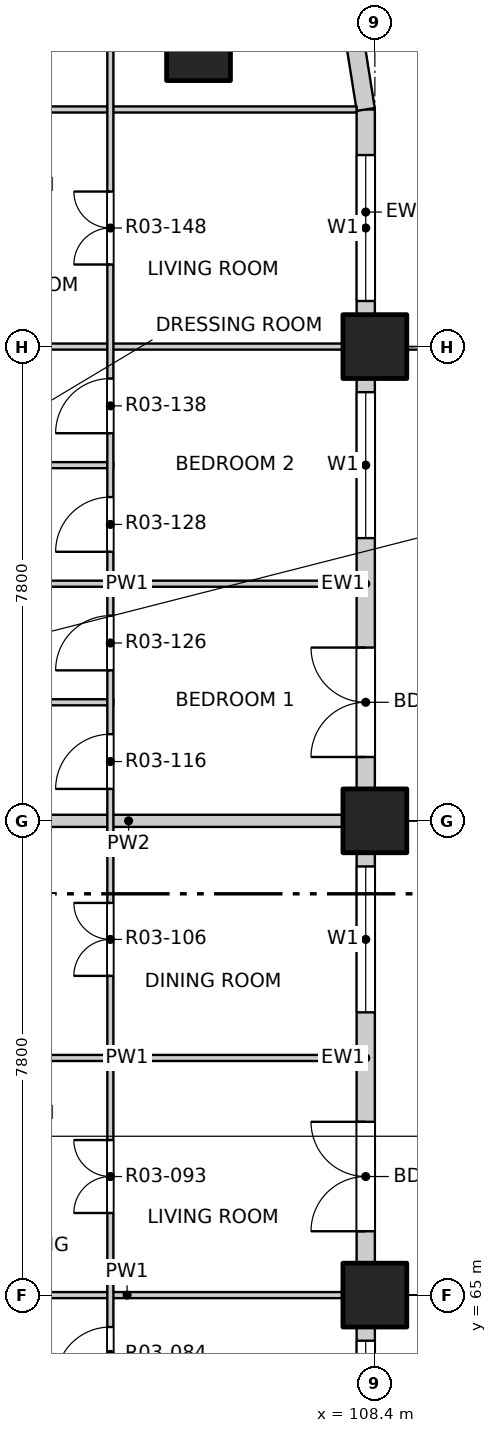
"""IFC4 building model, lengths in metres.
Left out: names, types, materials, properties, quantities, classifications, styles, units other than length and angle.
Written with IfcOpenShell. Run it as: python <this file> out.ifc"""

import sys

from ifc_helpers import new_model, si_unit, direction, frame, frame_2d, origin, origin_2d, place, context, subcontext, project, spatial, rectangle, extrude, element, fill, save


model = new_model("IFC4")
c1 = context("Model", 3, precision=1e-05, world=origin(), true_north=direction((0.0, 1.0)))
c2 = subcontext(c1, "Body", "Model", "MODEL_VIEW")
j1 = project(units=[si_unit("LENGTHUNIT", "METRE"), si_unit("PLANEANGLEUNIT", "RADIAN")], contexts=[c1])
p1 = place(None, origin())
s1 = spatial("IfcSite", under=j1, at=p1, CompositionType="ELEMENT")
p2 = place(p1, origin())
s2 = spatial("IfcBuilding", under=s1, at=p2, CompositionType="ELEMENT")
p3 = place(p2, frame((0.0, 0.0, 39.9)))
s3 = spatial("IfcBuildingStorey", under=s2, at=p3, CompositionType="ELEMENT", Elevation=39.9)
for number, where, z_axis, x_axis in (
    (1, (105.5, 85.5, -0.25), (0.0, 0.0, 1.0), (1.0, 0.0, 0.0)),
    (2, (108.4, 65.0, -0.25), (0.0, 0.0, 1.0), (1.0, 0.0, 0.0)),
    (3, (108.4, 72.8, -0.25), (0.0, 0.0, 1.0), (1.0, 0.0, 0.0)),
    (4, (108.4, 80.6, -0.25), (0.0, 0.0, 1.0), (1.0, 0.0, 0.0)),
):
    element("IfcColumn", number, at=place(p3, frame(where, z_axis=z_axis, x_axis=x_axis)), inside=s3, PredefinedType="COLUMN", context=c2, shape_type="SweptSolid", body=[
        extrude(rectangle(XDim=1.05, YDim=1.05, at=origin_2d()), origin(), (0.0, 0.0, 1.0), 3.4),
    ])
p4 = place(p3, frame((108.25, 57.725, 0.0), z_axis=(0.0, 0.0, 1.0), x_axis=(0.0, 1.0, 0.0)))
e5 = element("IfcWall", 5, at=p4, inside=s3, PredefinedType="SOLIDWALL", context=c2, shape_type="SweptSolid", body=[
    extrude(rectangle(XDim=6.75, YDim=0.3, at=frame_2d((3.375, 0.0))), origin(), (0.0, 0.0, 1.0), 2.7),
])
p5 = place(p4, frame((0.525, 0.0, 0.0)))
e6 = element("IfcOpeningElement", 6, at=p5, cuts=e5, PredefinedType="OPENING", context=c2, shape_type="SweptSolid", body=[
    extrude(rectangle(XDim=1.8, YDim=2.4, at=frame_2d((0.9, 1.2))), frame((0.0, 0.16, 0.0), z_axis=(0.0, -1.0, 0.0), x_axis=(1.0, 0.0, 0.0)), (0.0, 0.0, 1.0), 0.32),
])
p6 = place(p4, frame((4.125, 0.0, 0.9)))
e7 = element("IfcOpeningElement", 7, at=p6, cuts=e5, PredefinedType="OPENING", context=c2, shape_type="SweptSolid", body=[
    extrude(rectangle(XDim=2.4, YDim=1.8, at=frame_2d((1.2, 0.9))), frame((0.0, 0.16, 0.0), z_axis=(0.0, -1.0, 0.0), x_axis=(1.0, 0.0, 0.0)), (0.0, 0.0, 1.0), 0.32),
])
p7 = place(p3, frame((108.25, 65.525, 0.0), z_axis=(0.0, 0.0, 1.0), x_axis=(0.0, 1.0, 0.0)))
e8 = element("IfcWall", 8, at=p7, inside=s3, PredefinedType="SOLIDWALL", context=c2, shape_type="SweptSolid", body=[
    extrude(rectangle(XDim=6.75, YDim=0.3, at=frame_2d((3.375, 0.0))), origin(), (0.0, 0.0, 1.0), 2.7),
])
p8 = place(p7, frame((0.525, 0.0, 0.0)))
e9 = element("IfcOpeningElement", 9, at=p8, cuts=e8, PredefinedType="OPENING", context=c2, shape_type="SweptSolid", body=[
    extrude(rectangle(XDim=1.8, YDim=2.4, at=frame_2d((0.9, 1.2))), frame((0.0, 0.16, 0.0), z_axis=(0.0, -1.0, 0.0), x_axis=(1.0, 0.0, 0.0)), (0.0, 0.0, 1.0), 0.32),
])
p9 = place(p7, frame((4.125, 0.0, 0.9)))
e10 = element("IfcOpeningElement", 10, at=p9, cuts=e8, PredefinedType="OPENING", context=c2, shape_type="SweptSolid", body=[
    extrude(rectangle(XDim=2.4, YDim=1.8, at=frame_2d((1.2, 0.9))), frame((0.0, 0.16, 0.0), z_axis=(0.0, -1.0, 0.0), x_axis=(1.0, 0.0, 0.0)), (0.0, 0.0, 1.0), 0.32),
])
p10 = place(p3, frame((108.25, 73.325, 0.0), z_axis=(0.0, 0.0, 1.0), x_axis=(0.0, 1.0, 0.0)))
e11 = element("IfcWall", 11, at=p10, inside=s3, PredefinedType="SOLIDWALL", context=c2, shape_type="SweptSolid", body=[
    extrude(rectangle(XDim=6.75, YDim=0.3, at=frame_2d((3.375, 0.0))), origin(), (0.0, 0.0, 1.0), 2.7),
])
p11 = place(p10, frame((0.525, 0.0, 0.0)))
e12 = element("IfcOpeningElement", 12, at=p11, cuts=e11, PredefinedType="OPENING", context=c2, shape_type="SweptSolid", body=[
    extrude(rectangle(XDim=1.8, YDim=2.4, at=frame_2d((0.9, 1.2))), frame((0.0, 0.16, 0.0), z_axis=(0.0, -1.0, 0.0), x_axis=(1.0, 0.0, 0.0)), (0.0, 0.0, 1.0), 0.32),
])
p12 = place(p10, frame((4.125, 0.0, 0.9)))
e13 = element("IfcOpeningElement", 13, at=p12, cuts=e11, PredefinedType="OPENING", context=c2, shape_type="SweptSolid", body=[
    extrude(rectangle(XDim=2.4, YDim=1.8, at=frame_2d((1.2, 0.9))), frame((0.0, 0.16, 0.0), z_axis=(0.0, -1.0, 0.0), x_axis=(1.0, 0.0, 0.0)), (0.0, 0.0, 1.0), 0.32),
])
p13 = place(p3, frame((108.25, 81.125, 0.0), z_axis=(0.0, 0.0, 1.0), x_axis=(0.0, 1.0, 0.0)))
e14 = element("IfcWall", 14, at=p13, inside=s3, PredefinedType="SOLIDWALL", context=c2, shape_type="SweptSolid", body=[
    extrude(rectangle(XDim=3.375, YDim=0.3, at=frame_2d((1.688, 0.0))), origin(), (0.0, 0.0, 1.0), 2.7),
])
p14 = place(p13, frame((0.225, 0.0, 0.9)))
e15 = element("IfcOpeningElement", 15, at=p14, cuts=e14, PredefinedType="OPENING", context=c2, shape_type="SweptSolid", body=[
    extrude(rectangle(XDim=2.4, YDim=1.8, at=frame_2d((1.2, 0.9))), frame((0.0, 0.16, 0.0), z_axis=(0.0, -1.0, 0.0), x_axis=(1.0, 0.0, 0.0)), (0.0, 0.0, 1.0), 0.32),
])
p15 = place(p3, frame((108.25, 84.5, 0.0), z_axis=(0.0, 0.0, 1.0), x_axis=(-0.156496880861, 0.987678452879, 0.0)))
e16 = element("IfcWall", 16, at=p15, inside=s3, PredefinedType="SOLIDWALL", context=c2, shape_type="SweptSolid", body=[
    extrude(rectangle(XDim=1.173, YDim=0.3, at=frame_2d((0.586, 0.0))), origin(), (0.0, 0.0, 1.0), 2.7),
])
p16 = place(p3, frame((100.55, 65.0, 0.0), z_axis=(0.0, 0.0, 1.0), x_axis=(1.0, 0.0, 0.0)))
e17 = element("IfcWall", 17, at=p16, inside=s3, PredefinedType="PARTITIONING", context=c2, shape_type="SweptSolid", body=[
    extrude(rectangle(XDim=7.55, YDim=0.1, at=frame_2d((3.775, 0.0))), origin(), (0.0, 0.0, 1.0), 2.55),
])
p17 = place(p3, frame((100.55, 68.9, 0.0), z_axis=(0.0, 0.0, 1.0), x_axis=(1.0, 0.0, 0.0)))
e18 = element("IfcWall", 18, at=p17, inside=s3, PredefinedType="PARTITIONING", context=c2, shape_type="SweptSolid", body=[
    extrude(rectangle(XDim=7.55, YDim=0.1, at=frame_2d((3.775, 0.0))), origin(), (0.0, 0.0, 1.0), 3.15),
])
p18 = place(p3, frame((100.6, 72.8, 0.0), z_axis=(0.0, 0.0, 1.0), x_axis=(1.0, 0.0, 0.0)))
e19 = element("IfcWall", 19, at=p18, inside=s3, PredefinedType="PARTITIONING", context=c2, shape_type="SweptSolid", body=[
    extrude(rectangle(XDim=7.5, YDim=0.2, at=frame_2d((3.75, 0.0))), origin(), (0.0, 0.0, 1.0), 2.55),
])
p19 = place(p3, frame((100.55, 74.75, 0.0), z_axis=(0.0, 0.0, 1.0), x_axis=(1.0, 0.0, 0.0)))
e20 = element("IfcWall", 20, at=p19, inside=s3, PredefinedType="PARTITIONING", context=c2, shape_type="SweptSolid", body=[
    extrude(rectangle(XDim=3.55, YDim=0.1, at=frame_2d((1.775, 0.0))), origin(), (0.0, 0.0, 1.0), 3.15),
])
p20 = place(p3, frame((100.55, 76.7, 0.0), z_axis=(0.0, 0.0, 1.0), x_axis=(1.0, 0.0, 0.0)))
e21 = element("IfcWall", 21, at=p20, inside=s3, PredefinedType="PARTITIONING", context=c2, shape_type="SweptSolid", body=[
    extrude(rectangle(XDim=7.55, YDim=0.1, at=frame_2d((3.775, 0.0))), origin(), (0.0, 0.0, 1.0), 3.15),
])
p21 = place(p3, frame((100.55, 78.65, 0.0), z_axis=(0.0, 0.0, 1.0), x_axis=(1.0, 0.0, 0.0)))
e22 = element("IfcWall", 22, at=p21, inside=s3, PredefinedType="PARTITIONING", context=c2, shape_type="SweptSolid", body=[
    extrude(rectangle(XDim=3.55, YDim=0.1, at=frame_2d((1.775, 0.0))), origin(), (0.0, 0.0, 1.0), 3.15),
])
p22 = place(p3, frame((100.55, 80.6, 0.0), z_axis=(0.0, 0.0, 1.0), x_axis=(1.0, 0.0, 0.0)))
e23 = element("IfcWall", 23, at=p22, inside=s3, PredefinedType="PARTITIONING", context=c2, shape_type="SweptSolid", body=[
    extrude(rectangle(XDim=7.55, YDim=0.1, at=frame_2d((3.775, 0.0))), origin(), (0.0, 0.0, 1.0), 2.55),
])
p23 = place(p3, frame((96.6, 84.5, 0.0), z_axis=(0.0, 0.0, 1.0), x_axis=(1.0, 0.0, 0.0)))
e24 = element("IfcWall", 24, at=p23, inside=s3, PredefinedType="PARTITIONING", context=c2, shape_type="SweptSolid", body=[
    extrude(rectangle(XDim=11.5, YDim=0.1, at=frame_2d((5.75, 0.0))), origin(), (0.0, 0.0, 1.0), 3.15),
])
p24 = place(p23, frame((2.635, 0.0, 0.0)))
e25 = element("IfcOpeningElement", 25, at=p24, cuts=e24, PredefinedType="OPENING", context=c2, shape_type="SweptSolid", body=[
    extrude(rectangle(XDim=0.9, YDim=2.1, at=frame_2d((0.45, 1.05))), frame((0.0, 0.06, 0.0), z_axis=(0.0, -1.0, 0.0), x_axis=(1.0, 0.0, 0.0)), (0.0, 0.0, 1.0), 0.12),
])
p25 = place(p3, frame((104.05, 41.9, 0.0), z_axis=(0.0, 0.0, 1.0), x_axis=(0.0, 1.0, 0.0)))
e26 = element("IfcWall", 26, at=p25, inside=s3, PredefinedType="PARTITIONING", context=c2, shape_type="SweptSolid", body=[
    extrude(rectangle(XDim=46.2, YDim=0.1, at=frame_2d((23.1, 0.0))), origin(), (0.0, 0.0, 1.0), 3.15),
])
p26 = place(p25, frame((1.05, 0.0, 0.0)))
e27 = element("IfcOpeningElement", 27, at=p26, cuts=e26, PredefinedType="OPENING", context=c2, shape_type="SweptSolid", body=[
    extrude(rectangle(XDim=1.2, YDim=2.1, at=frame_2d((0.6, 1.05))), frame((0.0, 0.06, 0.0), z_axis=(0.0, -1.0, 0.0), x_axis=(1.0, 0.0, 0.0)), (0.0, 0.0, 1.0), 0.12),
])
p27 = place(p25, frame((4.125, 0.0, 0.0)))
e28 = element("IfcOpeningElement", 28, at=p27, cuts=e26, PredefinedType="OPENING", context=c2, shape_type="SweptSolid", body=[
    extrude(rectangle(XDim=0.9, YDim=2.1, at=frame_2d((0.45, 1.05))), frame((0.0, 0.06, 0.0), z_axis=(0.0, -1.0, 0.0), x_axis=(1.0, 0.0, 0.0)), (0.0, 0.0, 1.0), 0.12),
])
p28 = place(p25, frame((6.075, 0.0, 0.0)))
e29 = element("IfcOpeningElement", 29, at=p28, cuts=e26, PredefinedType="OPENING", context=c2, shape_type="SweptSolid", body=[
    extrude(rectangle(XDim=0.9, YDim=2.1, at=frame_2d((0.45, 1.05))), frame((0.0, 0.06, 0.0), z_axis=(0.0, -1.0, 0.0), x_axis=(1.0, 0.0, 0.0)), (0.0, 0.0, 1.0), 0.12),
])
p29 = place(p25, frame((8.85, 0.0, 0.0)))
e30 = element("IfcOpeningElement", 30, at=p29, cuts=e26, PredefinedType="OPENING", context=c2, shape_type="SweptSolid", body=[
    extrude(rectangle(XDim=1.2, YDim=2.1, at=frame_2d((0.6, 1.05))), frame((0.0, 0.06, 0.0), z_axis=(0.0, -1.0, 0.0), x_axis=(1.0, 0.0, 0.0)), (0.0, 0.0, 1.0), 0.12),
])
p30 = place(p25, frame((11.925, 0.0, 0.0)))
e31 = element("IfcOpeningElement", 31, at=p30, cuts=e26, PredefinedType="OPENING", context=c2, shape_type="SweptSolid", body=[
    extrude(rectangle(XDim=0.9, YDim=2.1, at=frame_2d((0.45, 1.05))), frame((0.0, 0.06, 0.0), z_axis=(0.0, -1.0, 0.0), x_axis=(1.0, 0.0, 0.0)), (0.0, 0.0, 1.0), 0.12),
])
p31 = place(p25, frame((13.875, 0.0, 0.0)))
e32 = element("IfcOpeningElement", 32, at=p31, cuts=e26, PredefinedType="OPENING", context=c2, shape_type="SweptSolid", body=[
    extrude(rectangle(XDim=0.9, YDim=2.1, at=frame_2d((0.45, 1.05))), frame((0.0, 0.06, 0.0), z_axis=(0.0, -1.0, 0.0), x_axis=(1.0, 0.0, 0.0)), (0.0, 0.0, 1.0), 0.12),
])
p32 = place(p25, frame((15.825, 0.0, 0.0)))
e33 = element("IfcOpeningElement", 33, at=p32, cuts=e26, PredefinedType="OPENING", context=c2, shape_type="SweptSolid", body=[
    extrude(rectangle(XDim=0.9, YDim=2.1, at=frame_2d((0.45, 1.05))), frame((0.0, 0.06, 0.0), z_axis=(0.0, -1.0, 0.0), x_axis=(1.0, 0.0, 0.0)), (0.0, 0.0, 1.0), 0.12),
])
p33 = place(p25, frame((17.775, 0.0, 0.0)))
e34 = element("IfcOpeningElement", 34, at=p33, cuts=e26, PredefinedType="OPENING", context=c2, shape_type="SweptSolid", body=[
    extrude(rectangle(XDim=0.9, YDim=2.1, at=frame_2d((0.45, 1.05))), frame((0.0, 0.06, 0.0), z_axis=(0.0, -1.0, 0.0), x_axis=(1.0, 0.0, 0.0)), (0.0, 0.0, 1.0), 0.12),
])
p34 = place(p25, frame((19.725, 0.0, 0.0)))
e35 = element("IfcOpeningElement", 35, at=p34, cuts=e26, PredefinedType="OPENING", context=c2, shape_type="SweptSolid", body=[
    extrude(rectangle(XDim=0.9, YDim=2.1, at=frame_2d((0.45, 1.05))), frame((0.0, 0.06, 0.0), z_axis=(0.0, -1.0, 0.0), x_axis=(1.0, 0.0, 0.0)), (0.0, 0.0, 1.0), 0.12),
])
p35 = place(p25, frame((21.675, 0.0, 0.0)))
e36 = element("IfcOpeningElement", 36, at=p35, cuts=e26, PredefinedType="OPENING", context=c2, shape_type="SweptSolid", body=[
    extrude(rectangle(XDim=0.9, YDim=2.1, at=frame_2d((0.45, 1.05))), frame((0.0, 0.06, 0.0), z_axis=(0.0, -1.0, 0.0), x_axis=(1.0, 0.0, 0.0)), (0.0, 0.0, 1.0), 0.12),
])
p36 = place(p25, frame((24.45, 0.0, 0.0)))
e37 = element("IfcOpeningElement", 37, at=p36, cuts=e26, PredefinedType="OPENING", context=c2, shape_type="SweptSolid", body=[
    extrude(rectangle(XDim=1.2, YDim=2.1, at=frame_2d((0.6, 1.05))), frame((0.0, 0.06, 0.0), z_axis=(0.0, -1.0, 0.0), x_axis=(1.0, 0.0, 0.0)), (0.0, 0.0, 1.0), 0.12),
])
p37 = place(p25, frame((28.35, 0.0, 0.0)))
e38 = element("IfcOpeningElement", 38, at=p37, cuts=e26, PredefinedType="OPENING", context=c2, shape_type="SweptSolid", body=[
    extrude(rectangle(XDim=1.2, YDim=2.1, at=frame_2d((0.6, 1.05))), frame((0.0, 0.06, 0.0), z_axis=(0.0, -1.0, 0.0), x_axis=(1.0, 0.0, 0.0)), (0.0, 0.0, 1.0), 0.12),
])
p38 = place(p25, frame((31.425, 0.0, 0.0)))
e39 = element("IfcOpeningElement", 39, at=p38, cuts=e26, PredefinedType="OPENING", context=c2, shape_type="SweptSolid", body=[
    extrude(rectangle(XDim=0.9, YDim=2.1, at=frame_2d((0.45, 1.05))), frame((0.0, 0.06, 0.0), z_axis=(0.0, -1.0, 0.0), x_axis=(1.0, 0.0, 0.0)), (0.0, 0.0, 1.0), 0.12),
])
p39 = place(p25, frame((33.375, 0.0, 0.0)))
e40 = element("IfcOpeningElement", 40, at=p39, cuts=e26, PredefinedType="OPENING", context=c2, shape_type="SweptSolid", body=[
    extrude(rectangle(XDim=0.9, YDim=2.1, at=frame_2d((0.45, 1.05))), frame((0.0, 0.06, 0.0), z_axis=(0.0, -1.0, 0.0), x_axis=(1.0, 0.0, 0.0)), (0.0, 0.0, 1.0), 0.12),
])
p40 = place(p25, frame((35.325, 0.0, 0.0)))
e41 = element("IfcOpeningElement", 41, at=p40, cuts=e26, PredefinedType="OPENING", context=c2, shape_type="SweptSolid", body=[
    extrude(rectangle(XDim=0.9, YDim=2.1, at=frame_2d((0.45, 1.05))), frame((0.0, 0.06, 0.0), z_axis=(0.0, -1.0, 0.0), x_axis=(1.0, 0.0, 0.0)), (0.0, 0.0, 1.0), 0.12),
])
p41 = place(p25, frame((37.275, 0.0, 0.0)))
e42 = element("IfcOpeningElement", 42, at=p41, cuts=e26, PredefinedType="OPENING", context=c2, shape_type="SweptSolid", body=[
    extrude(rectangle(XDim=0.9, YDim=2.1, at=frame_2d((0.45, 1.05))), frame((0.0, 0.06, 0.0), z_axis=(0.0, -1.0, 0.0), x_axis=(1.0, 0.0, 0.0)), (0.0, 0.0, 1.0), 0.12),
])
p42 = place(p25, frame((40.05, 0.0, 0.0)))
e43 = element("IfcOpeningElement", 43, at=p42, cuts=e26, PredefinedType="OPENING", context=c2, shape_type="SweptSolid", body=[
    extrude(rectangle(XDim=1.2, YDim=2.1, at=frame_2d((0.6, 1.05))), frame((0.0, 0.06, 0.0), z_axis=(0.0, -1.0, 0.0), x_axis=(1.0, 0.0, 0.0)), (0.0, 0.0, 1.0), 0.12),
])
p43 = place(p25, frame((43.95, 0.0, 0.0)))
e44 = element("IfcOpeningElement", 44, at=p43, cuts=e26, PredefinedType="OPENING", context=c2, shape_type="SweptSolid", body=[
    extrude(rectangle(XDim=1.2, YDim=2.1, at=frame_2d((0.6, 1.05))), frame((0.0, 0.06, 0.0), z_axis=(0.0, -1.0, 0.0), x_axis=(1.0, 0.0, 0.0)), (0.0, 0.0, 1.0), 0.12),
])
p44 = place(p6, origin())
e45 = element("IfcWindow", 45, at=p44, inside=s3, PartitioningType="DOUBLE_PANEL_VERTICAL", PredefinedType="WINDOW", context=c2, shape_type="SweptSolid", body=[
    extrude(rectangle(XDim=2.4, YDim=1.8, at=frame_2d((1.2, 0.9))), frame((0.0, 0.03, 0.0), z_axis=(0.0, -1.0, 0.0), x_axis=(1.0, 0.0, 0.0)), (0.0, 0.0, 1.0), 0.06),
])
fill(e7, e45)
p45 = place(p8, origin())
e46 = element("IfcDoor", 46, at=p45, inside=s3, OperationType="DOUBLE_DOOR_SINGLE_SWING", PredefinedType="DOOR", context=c2, shape_type="SweptSolid", body=[
    extrude(rectangle(XDim=1.8, YDim=2.4, at=frame_2d((0.9, 1.2))), frame((0.0, 0.025, 0.0), z_axis=(0.0, -1.0, 0.0), x_axis=(1.0, 0.0, 0.0)), (0.0, 0.0, 1.0), 0.05),
])
fill(e9, e46)
p46 = place(p9, origin())
e47 = element("IfcWindow", 47, at=p46, inside=s3, PartitioningType="DOUBLE_PANEL_VERTICAL", PredefinedType="WINDOW", context=c2, shape_type="SweptSolid", body=[
    extrude(rectangle(XDim=2.4, YDim=1.8, at=frame_2d((1.2, 0.9))), frame((0.0, 0.03, 0.0), z_axis=(0.0, -1.0, 0.0), x_axis=(1.0, 0.0, 0.0)), (0.0, 0.0, 1.0), 0.06),
])
fill(e10, e47)
p47 = place(p11, origin())
e48 = element("IfcDoor", 48, at=p47, inside=s3, OperationType="DOUBLE_DOOR_SINGLE_SWING", PredefinedType="DOOR", context=c2, shape_type="SweptSolid", body=[
    extrude(rectangle(XDim=1.8, YDim=2.4, at=frame_2d((0.9, 1.2))), frame((0.0, 0.025, 0.0), z_axis=(0.0, -1.0, 0.0), x_axis=(1.0, 0.0, 0.0)), (0.0, 0.0, 1.0), 0.05),
])
fill(e12, e48)
p48 = place(p12, origin())
e49 = element("IfcWindow", 49, at=p48, inside=s3, PartitioningType="DOUBLE_PANEL_VERTICAL", PredefinedType="WINDOW", context=c2, shape_type="SweptSolid", body=[
    extrude(rectangle(XDim=2.4, YDim=1.8, at=frame_2d((1.2, 0.9))), frame((0.0, 0.03, 0.0), z_axis=(0.0, -1.0, 0.0), x_axis=(1.0, 0.0, 0.0)), (0.0, 0.0, 1.0), 0.06),
])
fill(e13, e49)
p49 = place(p14, origin())
e50 = element("IfcWindow", 50, at=p49, inside=s3, PartitioningType="DOUBLE_PANEL_VERTICAL", PredefinedType="WINDOW", context=c2, shape_type="SweptSolid", body=[
    extrude(rectangle(XDim=2.4, YDim=1.8, at=frame_2d((1.2, 0.9))), frame((0.0, 0.03, 0.0), z_axis=(0.0, -1.0, 0.0), x_axis=(1.0, 0.0, 0.0)), (0.0, 0.0, 1.0), 0.06),
])
fill(e15, e50)
p50 = place(p35, origin())
e51 = element("IfcDoor", 51, at=p50, inside=s3, OperationType="SINGLE_SWING_LEFT", PredefinedType="DOOR", context=c2, shape_type="SweptSolid", body=[
    extrude(rectangle(XDim=0.9, YDim=2.1, at=frame_2d((0.45, 1.05))), frame((0.0, 0.025, 0.0), z_axis=(0.0, -1.0, 0.0), x_axis=(1.0, 0.0, 0.0)), (0.0, 0.0, 1.0), 0.05),
])
fill(e36, e51)
p51 = place(p36, origin())
e52 = element("IfcDoor", 52, at=p51, inside=s3, OperationType="DOUBLE_DOOR_SINGLE_SWING", PredefinedType="DOOR", context=c2, shape_type="SweptSolid", body=[
    extrude(rectangle(XDim=1.2, YDim=2.1, at=frame_2d((0.6, 1.05))), frame((0.0, 0.025, 0.0), z_axis=(0.0, -1.0, 0.0), x_axis=(1.0, 0.0, 0.0)), (0.0, 0.0, 1.0), 0.05),
])
fill(e37, e52)
p52 = place(p37, origin())
e53 = element("IfcDoor", 53, at=p52, inside=s3, OperationType="DOUBLE_DOOR_SINGLE_SWING", PredefinedType="DOOR", context=c2, shape_type="SweptSolid", body=[
    extrude(rectangle(XDim=1.2, YDim=2.1, at=frame_2d((0.6, 1.05))), frame((0.0, 0.025, 0.0), z_axis=(0.0, -1.0, 0.0), x_axis=(1.0, 0.0, 0.0)), (0.0, 0.0, 1.0), 0.05),
])
fill(e38, e53)
p53 = place(p38, origin())
e54 = element("IfcDoor", 54, at=p53, inside=s3, OperationType="SINGLE_SWING_LEFT", PredefinedType="DOOR", context=c2, shape_type="SweptSolid", body=[
    extrude(rectangle(XDim=0.9, YDim=2.1, at=frame_2d((0.45, 1.05))), frame((0.0, 0.025, 0.0), z_axis=(0.0, -1.0, 0.0), x_axis=(1.0, 0.0, 0.0)), (0.0, 0.0, 1.0), 0.05),
])
fill(e39, e54)
p54 = place(p39, origin())
e55 = element("IfcDoor", 55, at=p54, inside=s3, OperationType="SINGLE_SWING_LEFT", PredefinedType="DOOR", context=c2, shape_type="SweptSolid", body=[
    extrude(rectangle(XDim=0.9, YDim=2.1, at=frame_2d((0.45, 1.05))), frame((0.0, 0.025, 0.0), z_axis=(0.0, -1.0, 0.0), x_axis=(1.0, 0.0, 0.0)), (0.0, 0.0, 1.0), 0.05),
])
fill(e40, e55)
p55 = place(p40, origin())
e56 = element("IfcDoor", 56, at=p55, inside=s3, OperationType="SINGLE_SWING_LEFT", PredefinedType="DOOR", context=c2, shape_type="SweptSolid", body=[
    extrude(rectangle(XDim=0.9, YDim=2.1, at=frame_2d((0.45, 1.05))), frame((0.0, 0.025, 0.0), z_axis=(0.0, -1.0, 0.0), x_axis=(1.0, 0.0, 0.0)), (0.0, 0.0, 1.0), 0.05),
])
fill(e41, e56)
p56 = place(p41, origin())
e57 = element("IfcDoor", 57, at=p56, inside=s3, OperationType="SINGLE_SWING_LEFT", PredefinedType="DOOR", context=c2, shape_type="SweptSolid", body=[
    extrude(rectangle(XDim=0.9, YDim=2.1, at=frame_2d((0.45, 1.05))), frame((0.0, 0.025, 0.0), z_axis=(0.0, -1.0, 0.0), x_axis=(1.0, 0.0, 0.0)), (0.0, 0.0, 1.0), 0.05),
])
fill(e42, e57)
p57 = place(p42, origin())
e58 = element("IfcDoor", 58, at=p57, inside=s3, OperationType="DOUBLE_DOOR_SINGLE_SWING", PredefinedType="DOOR", context=c2, shape_type="SweptSolid", body=[
    extrude(rectangle(XDim=1.2, YDim=2.1, at=frame_2d((0.6, 1.05))), frame((0.0, 0.025, 0.0), z_axis=(0.0, -1.0, 0.0), x_axis=(1.0, 0.0, 0.0)), (0.0, 0.0, 1.0), 0.05),
])
fill(e43, e58)
save(model, sys.argv[1])
